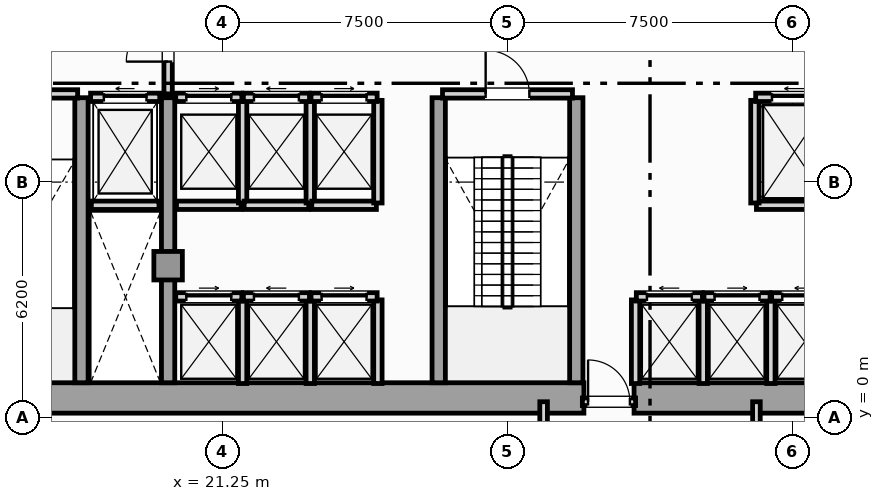
"""IFC4 building model, lengths in metres.
Left out: names, types, materials, properties, quantities, classifications, styles, units other than length and angle.
Written with IfcOpenShell. Run it as: python <this file> out.ifc"""

import sys

from ifc_helpers import new_model, si_unit, direction, frame, frame_2d, origin, origin_2d, place, context, subcontext, project, spatial, rectangle, extrude, element, fill, save


model = new_model("IFC4")
c1 = context("Model", 3, precision=1e-05, world=origin(), true_north=direction((0.0, 1.0)))
c2 = subcontext(c1, "Body", "Model", "MODEL_VIEW")
j1 = project(units=[si_unit("LENGTHUNIT", "METRE"), si_unit("PLANEANGLEUNIT", "RADIAN")], contexts=[c1])
p1 = place(None, origin())
s1 = spatial("IfcSite", under=j1, at=p1, CompositionType="ELEMENT")
p2 = place(p1, origin())
s2 = spatial("IfcBuilding", under=s1, at=p2, CompositionType="ELEMENT")
p3 = place(p2, origin())
s3 = spatial("IfcBuildingStorey", under=s2, at=p3, CompositionType="ELEMENT", Elevation=0.0)
p4 = place(p3, frame((13.25, 0.52, 0.0), z_axis=(0.0, 0.0, 1.0), x_axis=(1.0, 0.0, 0.0)))
e1 = element("IfcWall", 1, at=p4, inside=s3, PredefinedType="SHEAR", context=c2, shape_type="SweptSolid", body=[
    extrude(rectangle(XDim=17.51, YDim=0.8, at=frame_2d((8.755, 0.0))), origin(), (0.0, 0.0, 1.0), 5.1),
])
p5 = place(p3, frame((32.08, 0.52, 0.0), z_axis=(0.0, 0.0, 1.0), x_axis=(1.0, 0.0, 0.0)))
e2 = element("IfcWall", 2, at=p5, inside=s3, PredefinedType="SHEAR", context=c2, shape_type="SweptSolid", body=[
    extrude(rectangle(XDim=12.17, YDim=0.8, at=frame_2d((6.085, 0.0))), origin(), (0.0, 0.0, 1.0), 5.1),
])
for number, where, z_axis, x_axis in (
    (3, (17.54, 0.92, 0.0), (0.0, 0.0, 1.0), (0.0, 1.0, 0.0)),
    (4, (19.82, 0.92, 0.0), (0.0, 0.0, 1.0), (0.0, 1.0, 0.0)),
    (5, (26.94, 0.92, 0.0), (0.0, 0.0, 1.0), (0.0, 1.0, 0.0)),
    (6, (30.56, 0.92, 0.0), (0.0, 0.0, 1.0), (0.0, 1.0, 0.0)),
):
    element("IfcWall", number, at=place(p3, frame(where, z_axis=z_axis, x_axis=x_axis)), inside=s3, PredefinedType="SHEAR", context=c2, shape_type="SweptSolid", body=[
        extrude(rectangle(XDim=7.5, YDim=0.35, at=frame_2d((3.75, 0.0))), origin(), (0.0, 0.0, 1.0), 5.1),
    ])
p6 = place(p3, frame((19.82, 4.0, 0.0), z_axis=(0.0, 0.0, 1.0), x_axis=(1.0, 0.0, 0.0)))
e7 = element("IfcColumn", 7, at=p6, inside=s3, PredefinedType="COLUMN", context=c2, shape_type="SweptSolid", body=[
    extrude(rectangle(XDim=0.75, YDim=0.75, at=origin_2d()), origin(), (0.0, 0.0, 1.0), 5.4),
])
p7 = place(p3, frame((17.8, 5.59, 0.0), z_axis=(0.0, 0.0, 1.0), x_axis=(1.0, 0.0, 0.0)))
e8 = element("IfcWall", 8, at=p7, inside=s3, PredefinedType="SOLIDWALL", context=c2, shape_type="SweptSolid", body=[
    extrude(rectangle(XDim=1.78, YDim=0.22, at=frame_2d((0.89, 0.0))), origin(), (0.0, 0.0, 1.0), 5.1),
])
p8 = place(p3, frame((17.78, 8.43, 0.0), z_axis=(0.0, 0.0, 1.0), x_axis=(1.0, 0.0, 0.0)))
e9 = element("IfcWall", 9, at=p8, inside=s3, PredefinedType="SOLIDWALL", context=c2, shape_type="SweptSolid", body=[
    extrude(rectangle(XDim=1.82, YDim=0.22, at=frame_2d((0.91, 0.0))), origin(), (0.0, 0.0, 1.0), 5.1),
])
p9 = place(p8, frame((0.35, 0.0, 0.0)))
e10 = element("IfcOpeningElement", 10, at=p9, cuts=e9, PredefinedType="OPENING", context=c2, shape_type="SweptSolid", body=[
    extrude(rectangle(XDim=1.12, YDim=2.25, at=frame_2d((0.56, 1.125))), frame((0.0, 0.12, 0.0), z_axis=(0.0, -1.0, 0.0), x_axis=(1.0, 0.0, 0.0)), (0.0, 0.0, 1.0), 0.24),
])
p10 = place(p3, frame((35.3, 5.59, 0.0), z_axis=(0.0, 0.0, 1.0), x_axis=(1.0, 0.0, 0.0)))
e11 = element("IfcWall", 11, at=p10, inside=s3, PredefinedType="SOLIDWALL", context=c2, shape_type="SweptSolid", body=[
    extrude(rectangle(XDim=2.0, YDim=0.22, at=frame_2d((1.0, 0.0))), origin(), (0.0, 0.0, 1.0), 5.1),
])
p11 = place(p3, frame((35.26, 5.65, 0.0), z_axis=(0.0, 0.0, 1.0), x_axis=(0.0, 1.0, 0.0)))
e12 = element("IfcWall", 12, at=p11, inside=s3, PredefinedType="SOLIDWALL", context=c2, shape_type="SweptSolid", body=[
    extrude(rectangle(XDim=2.7, YDim=0.22, at=frame_2d((1.35, 0.0))), origin(), (0.0, 0.0, 1.0), 5.1),
])
p12 = place(p3, frame((35.28, 8.43, 0.0), z_axis=(0.0, 0.0, 1.0), x_axis=(1.0, 0.0, 0.0)))
e13 = element("IfcWall", 13, at=p12, inside=s3, PredefinedType="SOLIDWALL", context=c2, shape_type="SweptSolid", body=[
    extrude(rectangle(XDim=2.04, YDim=0.22, at=frame_2d((1.02, 0.0))), origin(), (0.0, 0.0, 1.0), 5.1),
])
p13 = place(p12, frame((0.43, 0.0, 0.0)))
e14 = element("IfcOpeningElement", 14, at=p13, cuts=e13, PredefinedType="OPENING", context=c2, shape_type="SweptSolid", body=[
    extrude(rectangle(XDim=1.18, YDim=2.2, at=frame_2d((0.59, 1.1))), frame((0.0, 0.12, 0.0), z_axis=(0.0, -1.0, 0.0), x_axis=(1.0, 0.0, 0.0)), (0.0, 0.0, 1.0), 0.24),
])
p14 = place(p3, frame((21.78, 0.9, 0.0), z_axis=(0.0, 0.0, 1.0), x_axis=(0.0, 1.0, 0.0)))
e15 = element("IfcWall", 15, at=p14, inside=s3, PredefinedType="SOLIDWALL", context=c2, shape_type="SweptSolid", body=[
    extrude(rectangle(XDim=2.2, YDim=0.22, at=frame_2d((1.1, 0.0))), origin(), (0.0, 0.0, 1.0), 5.1),
])
p15 = place(p3, frame((20.02, 3.18, 0.0), z_axis=(0.0, 0.0, 1.0), x_axis=(1.0, 0.0, 0.0)))
e16 = element("IfcWall", 16, at=p15, inside=s3, PredefinedType="SOLIDWALL", context=c2, shape_type="SweptSolid", body=[
    extrude(rectangle(XDim=1.74, YDim=0.22, at=frame_2d((0.87, 0.0))), origin(), (0.0, 0.0, 1.0), 5.1),
])
p16 = place(p15, frame((0.28, 0.0, 0.0)))
e17 = element("IfcOpeningElement", 17, at=p16, cuts=e16, PredefinedType="OPENING", context=c2, shape_type="SweptSolid", body=[
    extrude(rectangle(XDim=1.18, YDim=2.2, at=frame_2d((0.59, 1.1))), frame((0.0, 0.12, 0.0), z_axis=(0.0, -1.0, 0.0), x_axis=(1.0, 0.0, 0.0)), (0.0, 0.0, 1.0), 0.24),
])
p17 = place(p3, frame((23.56, 0.9, 0.0), z_axis=(0.0, 0.0, 1.0), x_axis=(0.0, 1.0, 0.0)))
e18 = element("IfcWall", 18, at=p17, inside=s3, PredefinedType="SOLIDWALL", context=c2, shape_type="SweptSolid", body=[
    extrude(rectangle(XDim=2.2, YDim=0.22, at=frame_2d((1.1, 0.0))), origin(), (0.0, 0.0, 1.0), 5.1),
])
p18 = place(p3, frame((21.8, 3.18, 0.0), z_axis=(0.0, 0.0, 1.0), x_axis=(1.0, 0.0, 0.0)))
e19 = element("IfcWall", 19, at=p18, inside=s3, PredefinedType="SOLIDWALL", context=c2, shape_type="SweptSolid", body=[
    extrude(rectangle(XDim=1.74, YDim=0.22, at=frame_2d((0.87, 0.0))), origin(), (0.0, 0.0, 1.0), 5.1),
])
p19 = place(p18, frame((0.28, 0.0, 0.0)))
e20 = element("IfcOpeningElement", 20, at=p19, cuts=e19, PredefinedType="OPENING", context=c2, shape_type="SweptSolid", body=[
    extrude(rectangle(XDim=1.18, YDim=2.2, at=frame_2d((0.59, 1.1))), frame((0.0, 0.12, 0.0), z_axis=(0.0, -1.0, 0.0), x_axis=(1.0, 0.0, 0.0)), (0.0, 0.0, 1.0), 0.24),
])
p20 = place(p3, frame((25.34, 0.9, 0.0), z_axis=(0.0, 0.0, 1.0), x_axis=(0.0, 1.0, 0.0)))
e21 = element("IfcWall", 21, at=p20, inside=s3, PredefinedType="SOLIDWALL", context=c2, shape_type="SweptSolid", body=[
    extrude(rectangle(XDim=2.2, YDim=0.22, at=frame_2d((1.1, 0.0))), origin(), (0.0, 0.0, 1.0), 5.1),
])
p21 = place(p3, frame((23.58, 3.18, 0.0), z_axis=(0.0, 0.0, 1.0), x_axis=(1.0, 0.0, 0.0)))
e22 = element("IfcWall", 22, at=p21, inside=s3, PredefinedType="SOLIDWALL", context=c2, shape_type="SweptSolid", body=[
    extrude(rectangle(XDim=1.74, YDim=0.22, at=frame_2d((0.87, 0.0))), origin(), (0.0, 0.0, 1.0), 5.1),
])
p22 = place(p21, frame((0.28, 0.0, 0.0)))
e23 = element("IfcOpeningElement", 23, at=p22, cuts=e22, PredefinedType="OPENING", context=c2, shape_type="SweptSolid", body=[
    extrude(rectangle(XDim=1.18, YDim=2.2, at=frame_2d((0.59, 1.1))), frame((0.0, 0.12, 0.0), z_axis=(0.0, -1.0, 0.0), x_axis=(1.0, 0.0, 0.0)), (0.0, 0.0, 1.0), 0.24),
])
for number, where, z_axis, x_axis in (
    (24, (32.12, 0.9, 0.0), (0.0, 0.0, 1.0), (0.0, 1.0, 0.0)),
    (25, (33.9, 0.9, 0.0), (0.0, 0.0, 1.0), (0.0, 1.0, 0.0)),
):
    element("IfcWall", number, at=place(p3, frame(where, z_axis=z_axis, x_axis=x_axis)), inside=s3, PredefinedType="SOLIDWALL", context=c2, shape_type="SweptSolid", body=[
        extrude(rectangle(XDim=2.2, YDim=0.22, at=frame_2d((1.1, 0.0))), origin(), (0.0, 0.0, 1.0), 5.1),
    ])
p23 = place(p3, frame((32.14, 3.18, 0.0), z_axis=(0.0, 0.0, 1.0), x_axis=(1.0, 0.0, 0.0)))
e26 = element("IfcWall", 26, at=p23, inside=s3, PredefinedType="SOLIDWALL", context=c2, shape_type="SweptSolid", body=[
    extrude(rectangle(XDim=1.74, YDim=0.22, at=frame_2d((0.87, 0.0))), origin(), (0.0, 0.0, 1.0), 5.1),
])
p24 = place(p23, frame((0.28, 0.0, 0.0)))
e27 = element("IfcOpeningElement", 27, at=p24, cuts=e26, PredefinedType="OPENING", context=c2, shape_type="SweptSolid", body=[
    extrude(rectangle(XDim=1.18, YDim=2.2, at=frame_2d((0.59, 1.1))), frame((0.0, 0.12, 0.0), z_axis=(0.0, -1.0, 0.0), x_axis=(1.0, 0.0, 0.0)), (0.0, 0.0, 1.0), 0.24),
])
p25 = place(p3, frame((35.68, 0.9, 0.0), z_axis=(0.0, 0.0, 1.0), x_axis=(0.0, 1.0, 0.0)))
e28 = element("IfcWall", 28, at=p25, inside=s3, PredefinedType="SOLIDWALL", context=c2, shape_type="SweptSolid", body=[
    extrude(rectangle(XDim=2.2, YDim=0.22, at=frame_2d((1.1, 0.0))), origin(), (0.0, 0.0, 1.0), 5.1),
])
p26 = place(p3, frame((33.92, 3.18, 0.0), z_axis=(0.0, 0.0, 1.0), x_axis=(1.0, 0.0, 0.0)))
e29 = element("IfcWall", 29, at=p26, inside=s3, PredefinedType="SOLIDWALL", context=c2, shape_type="SweptSolid", body=[
    extrude(rectangle(XDim=1.74, YDim=0.22, at=frame_2d((0.87, 0.0))), origin(), (0.0, 0.0, 1.0), 5.1),
])
p27 = place(p26, frame((0.28, 0.0, 0.0)))
e30 = element("IfcOpeningElement", 30, at=p27, cuts=e29, PredefinedType="OPENING", context=c2, shape_type="SweptSolid", body=[
    extrude(rectangle(XDim=1.18, YDim=2.2, at=frame_2d((0.59, 1.1))), frame((0.0, 0.12, 0.0), z_axis=(0.0, -1.0, 0.0), x_axis=(1.0, 0.0, 0.0)), (0.0, 0.0, 1.0), 0.24),
])
p28 = place(p3, frame((35.7, 3.18, 0.0), z_axis=(0.0, 0.0, 1.0), x_axis=(1.0, 0.0, 0.0)))
e31 = element("IfcWall", 31, at=p28, inside=s3, PredefinedType="SOLIDWALL", context=c2, shape_type="SweptSolid", body=[
    extrude(rectangle(XDim=1.74, YDim=0.22, at=frame_2d((0.87, 0.0))), origin(), (0.0, 0.0, 1.0), 5.1),
])
p29 = place(p28, frame((0.28, 0.0, 0.0)))
e32 = element("IfcOpeningElement", 32, at=p29, cuts=e31, PredefinedType="OPENING", context=c2, shape_type="SweptSolid", body=[
    extrude(rectangle(XDim=1.18, YDim=2.2, at=frame_2d((0.59, 1.1))), frame((0.0, 0.12, 0.0), z_axis=(0.0, -1.0, 0.0), x_axis=(1.0, 0.0, 0.0)), (0.0, 0.0, 1.0), 0.24),
])
p30 = place(p3, frame((20.04, 5.59, 0.0), z_axis=(0.0, 0.0, 1.0), x_axis=(1.0, 0.0, 0.0)))
e33 = element("IfcWall", 33, at=p30, inside=s3, PredefinedType="SOLIDWALL", context=c2, shape_type="SweptSolid", body=[
    extrude(rectangle(XDim=1.7, YDim=0.22, at=frame_2d((0.85, 0.0))), origin(), (0.0, 0.0, 1.0), 5.1),
])
p31 = place(p3, frame((21.78, 5.65, 0.0), z_axis=(0.0, 0.0, 1.0), x_axis=(0.0, 1.0, 0.0)))
e34 = element("IfcWall", 34, at=p31, inside=s3, PredefinedType="SOLIDWALL", context=c2, shape_type="SweptSolid", body=[
    extrude(rectangle(XDim=2.7, YDim=0.22, at=frame_2d((1.35, 0.0))), origin(), (0.0, 0.0, 1.0), 5.1),
])
p32 = place(p3, frame((20.02, 8.43, 0.0), z_axis=(0.0, 0.0, 1.0), x_axis=(1.0, 0.0, 0.0)))
e35 = element("IfcWall", 35, at=p32, inside=s3, PredefinedType="SOLIDWALL", context=c2, shape_type="SweptSolid", body=[
    extrude(rectangle(XDim=1.74, YDim=0.22, at=frame_2d((0.87, 0.0))), origin(), (0.0, 0.0, 1.0), 5.1),
])
p33 = place(p32, frame((0.28, 0.0, 0.0)))
e36 = element("IfcOpeningElement", 36, at=p33, cuts=e35, PredefinedType="OPENING", context=c2, shape_type="SweptSolid", body=[
    extrude(rectangle(XDim=1.18, YDim=2.2, at=frame_2d((0.59, 1.1))), frame((0.0, 0.12, 0.0), z_axis=(0.0, -1.0, 0.0), x_axis=(1.0, 0.0, 0.0)), (0.0, 0.0, 1.0), 0.24),
])
p34 = place(p3, frame((21.82, 5.59, 0.0), z_axis=(0.0, 0.0, 1.0), x_axis=(1.0, 0.0, 0.0)))
e37 = element("IfcWall", 37, at=p34, inside=s3, PredefinedType="SOLIDWALL", context=c2, shape_type="SweptSolid", body=[
    extrude(rectangle(XDim=1.7, YDim=0.22, at=frame_2d((0.85, 0.0))), origin(), (0.0, 0.0, 1.0), 5.1),
])
p35 = place(p3, frame((23.56, 5.65, 0.0), z_axis=(0.0, 0.0, 1.0), x_axis=(0.0, 1.0, 0.0)))
e38 = element("IfcWall", 38, at=p35, inside=s3, PredefinedType="SOLIDWALL", context=c2, shape_type="SweptSolid", body=[
    extrude(rectangle(XDim=2.7, YDim=0.22, at=frame_2d((1.35, 0.0))), origin(), (0.0, 0.0, 1.0), 5.1),
])
p36 = place(p3, frame((21.8, 8.43, 0.0), z_axis=(0.0, 0.0, 1.0), x_axis=(1.0, 0.0, 0.0)))
e39 = element("IfcWall", 39, at=p36, inside=s3, PredefinedType="SOLIDWALL", context=c2, shape_type="SweptSolid", body=[
    extrude(rectangle(XDim=1.74, YDim=0.22, at=frame_2d((0.87, 0.0))), origin(), (0.0, 0.0, 1.0), 5.1),
])
p37 = place(p36, frame((0.28, 0.0, 0.0)))
e40 = element("IfcOpeningElement", 40, at=p37, cuts=e39, PredefinedType="OPENING", context=c2, shape_type="SweptSolid", body=[
    extrude(rectangle(XDim=1.18, YDim=2.2, at=frame_2d((0.59, 1.1))), frame((0.0, 0.12, 0.0), z_axis=(0.0, -1.0, 0.0), x_axis=(1.0, 0.0, 0.0)), (0.0, 0.0, 1.0), 0.24),
])
p38 = place(p3, frame((23.6, 5.59, 0.0), z_axis=(0.0, 0.0, 1.0), x_axis=(1.0, 0.0, 0.0)))
e41 = element("IfcWall", 41, at=p38, inside=s3, PredefinedType="SOLIDWALL", context=c2, shape_type="SweptSolid", body=[
    extrude(rectangle(XDim=1.7, YDim=0.22, at=frame_2d((0.85, 0.0))), origin(), (0.0, 0.0, 1.0), 5.1),
])
p39 = place(p3, frame((25.34, 5.65, 0.0), z_axis=(0.0, 0.0, 1.0), x_axis=(0.0, 1.0, 0.0)))
e42 = element("IfcWall", 42, at=p39, inside=s3, PredefinedType="SOLIDWALL", context=c2, shape_type="SweptSolid", body=[
    extrude(rectangle(XDim=2.7, YDim=0.22, at=frame_2d((1.35, 0.0))), origin(), (0.0, 0.0, 1.0), 5.1),
])
p40 = place(p3, frame((23.58, 8.43, 0.0), z_axis=(0.0, 0.0, 1.0), x_axis=(1.0, 0.0, 0.0)))
e43 = element("IfcWall", 43, at=p40, inside=s3, PredefinedType="SOLIDWALL", context=c2, shape_type="SweptSolid", body=[
    extrude(rectangle(XDim=1.74, YDim=0.22, at=frame_2d((0.87, 0.0))), origin(), (0.0, 0.0, 1.0), 5.1),
])
p41 = place(p40, frame((0.28, 0.0, 0.0)))
e44 = element("IfcOpeningElement", 44, at=p41, cuts=e43, PredefinedType="OPENING", context=c2, shape_type="SweptSolid", body=[
    extrude(rectangle(XDim=1.18, YDim=2.2, at=frame_2d((0.59, 1.1))), frame((0.0, 0.12, 0.0), z_axis=(0.0, -1.0, 0.0), x_axis=(1.0, 0.0, 0.0)), (0.0, 0.0, 1.0), 0.24),
])
p42 = place(p3, frame((30.72, 0.42, 0.0), z_axis=(0.0, 0.0, 1.0), x_axis=(1.0, 0.0, 0.0)))
e45 = element("IfcWall", 45, at=p42, inside=s3, PredefinedType="PARTITIONING", context=c2, shape_type="SweptSolid", body=[
    extrude(rectangle(XDim=1.4, YDim=0.2, at=frame_2d((0.7, 0.0))), origin(), (0.0, 0.0, 1.0), 4.555),
])
p43 = place(p42, frame((0.15, 0.0, 0.0)))
e46 = element("IfcOpeningElement", 46, at=p43, cuts=e45, PredefinedType="OPENING", context=c2, shape_type="SweptSolid", body=[
    extrude(rectangle(XDim=1.1, YDim=2.2, at=frame_2d((0.55, 1.1))), frame((0.0, 0.11, 0.0), z_axis=(0.0, -1.0, 0.0), x_axis=(1.0, 0.0, 0.0)), (0.0, 0.0, 1.0), 0.22),
])
for number, where, z_axis, x_axis in (
    (47, (29.7, -2.75, 0.0), (0.0, 0.0, 1.0), (0.0, 1.0, 0.0)),
    (48, (35.3, -2.75, 0.0), (0.0, 0.0, 1.0), (0.0, 1.0, 0.0)),
):
    element("IfcWall", number, at=place(p3, frame(where, z_axis=z_axis, x_axis=x_axis)), inside=s3, PredefinedType="PARTITIONING", context=c2, shape_type="SweptSolid", body=[
        extrude(rectangle(XDim=3.17, YDim=0.2, at=frame_2d((1.585, 0.0))), origin(), (0.0, 0.0, 1.0), 5.1),
    ])
p44 = place(p3, frame((14.04, 8.52, 0.0), z_axis=(0.0, 0.0, 1.0), x_axis=(1.0, 0.0, 0.0)))
e49 = element("IfcWall", 49, at=p44, inside=s3, PredefinedType="SOLIDWALL", context=c2, shape_type="SweptSolid", body=[
    extrude(rectangle(XDim=3.4, YDim=0.22, at=frame_2d((1.7, 0.0))), origin(), (0.0, 0.0, 1.0), 5.1),
])
p45 = place(p44, frame((1.125, 0.0, 0.0)))
e50 = element("IfcOpeningElement", 50, at=p45, cuts=e49, PredefinedType="OPENING", context=c2, shape_type="SweptSolid", body=[
    extrude(rectangle(XDim=1.15, YDim=2.2, at=frame_2d((0.575, 1.1))), frame((0.0, 0.12, 0.0), z_axis=(0.0, -1.0, 0.0), x_axis=(1.0, 0.0, 0.0)), (0.0, 0.0, 1.0), 0.24),
])
p46 = place(p3, frame((27.04, 8.52, 0.0), z_axis=(0.0, 0.0, 1.0), x_axis=(1.0, 0.0, 0.0)))
e51 = element("IfcWall", 51, at=p46, inside=s3, PredefinedType="SOLIDWALL", context=c2, shape_type="SweptSolid", body=[
    extrude(rectangle(XDim=3.42, YDim=0.22, at=frame_2d((1.71, 0.0))), origin(), (0.0, 0.0, 1.0), 5.1),
])
p47 = place(p46, frame((1.135, 0.0, 0.0)))
e52 = element("IfcOpeningElement", 52, at=p47, cuts=e51, PredefinedType="OPENING", context=c2, shape_type="SweptSolid", body=[
    extrude(rectangle(XDim=1.15, YDim=2.2, at=frame_2d((0.575, 1.1))), frame((0.0, 0.12, 0.0), z_axis=(0.0, -1.0, 0.0), x_axis=(1.0, 0.0, 0.0)), (0.0, 0.0, 1.0), 0.24),
])
p48 = place(p3, frame((19.82, 8.52, 0.0), z_axis=(0.0, 0.0, 1.0), x_axis=(0.0, 1.0, 0.0)))
e53 = element("IfcWall", 53, at=p48, inside=s3, PredefinedType="SOLIDWALL", context=c2, shape_type="SweptSolid", body=[
    extrude(rectangle(XDim=2.8, YDim=0.22, at=frame_2d((1.4, 0.0))), origin(), (0.0, 0.0, 1.0), 4.555),
])
p49 = place(p48, frame((0.85, 0.0, 0.0)))
e54 = element("IfcOpeningElement", 54, at=p49, cuts=e53, PredefinedType="OPENING", context=c2, shape_type="SweptSolid", body=[
    extrude(rectangle(XDim=1.1, YDim=2.2, at=frame_2d((0.55, 1.1))), frame((0.0, 0.12, 0.0), z_axis=(0.0, -1.0, 0.0), x_axis=(1.0, 0.0, 0.0)), (0.0, 0.0, 1.0), 0.24),
])
p50 = place(p9, origin())
e55 = element("IfcDoor", 55, at=p50, inside=s3, OperationType="SLIDING_TO_LEFT", PredefinedType="DOOR", context=c2, shape_type="SweptSolid", body=[
    extrude(rectangle(XDim=1.12, YDim=2.25, at=frame_2d((0.56, 1.125))), frame((0.0, 0.025, 0.0), z_axis=(0.0, -1.0, 0.0), x_axis=(1.0, 0.0, 0.0)), (0.0, 0.0, 1.0), 0.05),
])
fill(e10, e55)
p51 = place(p13, origin())
e56 = element("IfcDoor", 56, at=p51, inside=s3, OperationType="SLIDING_TO_LEFT", PredefinedType="DOOR", context=c2, shape_type="SweptSolid", body=[
    extrude(rectangle(XDim=1.18, YDim=2.2, at=frame_2d((0.59, 1.1))), frame((0.0, 0.025, 0.0), z_axis=(0.0, -1.0, 0.0), x_axis=(1.0, 0.0, 0.0)), (0.0, 0.0, 1.0), 0.05),
])
fill(e14, e56)
p52 = place(p16, origin())
e57 = element("IfcDoor", 57, at=p52, inside=s3, OperationType="SLIDING_TO_RIGHT", PredefinedType="DOOR", context=c2, shape_type="SweptSolid", body=[
    extrude(rectangle(XDim=1.18, YDim=2.2, at=frame_2d((0.59, 1.1))), frame((0.0, 0.025, 0.0), z_axis=(0.0, -1.0, 0.0), x_axis=(1.0, 0.0, 0.0)), (0.0, 0.0, 1.0), 0.05),
])
fill(e17, e57)
p53 = place(p19, origin())
e58 = element("IfcDoor", 58, at=p53, inside=s3, OperationType="SLIDING_TO_LEFT", PredefinedType="DOOR", context=c2, shape_type="SweptSolid", body=[
    extrude(rectangle(XDim=1.18, YDim=2.2, at=frame_2d((0.59, 1.1))), frame((0.0, 0.025, 0.0), z_axis=(0.0, -1.0, 0.0), x_axis=(1.0, 0.0, 0.0)), (0.0, 0.0, 1.0), 0.05),
])
fill(e20, e58)
p54 = place(p22, origin())
e59 = element("IfcDoor", 59, at=p54, inside=s3, OperationType="SLIDING_TO_RIGHT", PredefinedType="DOOR", context=c2, shape_type="SweptSolid", body=[
    extrude(rectangle(XDim=1.18, YDim=2.2, at=frame_2d((0.59, 1.1))), frame((0.0, 0.025, 0.0), z_axis=(0.0, -1.0, 0.0), x_axis=(1.0, 0.0, 0.0)), (0.0, 0.0, 1.0), 0.05),
])
fill(e23, e59)
p55 = place(p24, origin())
e60 = element("IfcDoor", 60, at=p55, inside=s3, OperationType="SLIDING_TO_LEFT", PredefinedType="DOOR", context=c2, shape_type="SweptSolid", body=[
    extrude(rectangle(XDim=1.18, YDim=2.2, at=frame_2d((0.59, 1.1))), frame((0.0, 0.025, 0.0), z_axis=(0.0, -1.0, 0.0), x_axis=(1.0, 0.0, 0.0)), (0.0, 0.0, 1.0), 0.05),
])
fill(e27, e60)
p56 = place(p27, origin())
e61 = element("IfcDoor", 61, at=p56, inside=s3, OperationType="SLIDING_TO_RIGHT", PredefinedType="DOOR", context=c2, shape_type="SweptSolid", body=[
    extrude(rectangle(XDim=1.18, YDim=2.2, at=frame_2d((0.59, 1.1))), frame((0.0, 0.025, 0.0), z_axis=(0.0, -1.0, 0.0), x_axis=(1.0, 0.0, 0.0)), (0.0, 0.0, 1.0), 0.05),
])
fill(e30, e61)
p57 = place(p29, origin())
e62 = element("IfcDoor", 62, at=p57, inside=s3, OperationType="SLIDING_TO_LEFT", PredefinedType="DOOR", context=c2, shape_type="SweptSolid", body=[
    extrude(rectangle(XDim=1.18, YDim=2.2, at=frame_2d((0.59, 1.1))), frame((0.0, 0.025, 0.0), z_axis=(0.0, -1.0, 0.0), x_axis=(1.0, 0.0, 0.0)), (0.0, 0.0, 1.0), 0.05),
])
fill(e32, e62)
p58 = place(p33, origin())
e63 = element("IfcDoor", 63, at=p58, inside=s3, OperationType="SLIDING_TO_RIGHT", PredefinedType="DOOR", context=c2, shape_type="SweptSolid", body=[
    extrude(rectangle(XDim=1.18, YDim=2.2, at=frame_2d((0.59, 1.1))), frame((0.0, 0.025, 0.0), z_axis=(0.0, -1.0, 0.0), x_axis=(1.0, 0.0, 0.0)), (0.0, 0.0, 1.0), 0.05),
])
fill(e36, e63)
p59 = place(p37, origin())
e64 = element("IfcDoor", 64, at=p59, inside=s3, OperationType="SLIDING_TO_LEFT", PredefinedType="DOOR", context=c2, shape_type="SweptSolid", body=[
    extrude(rectangle(XDim=1.18, YDim=2.2, at=frame_2d((0.59, 1.1))), frame((0.0, 0.025, 0.0), z_axis=(0.0, -1.0, 0.0), x_axis=(1.0, 0.0, 0.0)), (0.0, 0.0, 1.0), 0.05),
])
fill(e40, e64)
p60 = place(p41, origin())
e65 = element("IfcDoor", 65, at=p60, inside=s3, OperationType="SLIDING_TO_RIGHT", PredefinedType="DOOR", context=c2, shape_type="SweptSolid", body=[
    extrude(rectangle(XDim=1.18, YDim=2.2, at=frame_2d((0.59, 1.1))), frame((0.0, 0.025, 0.0), z_axis=(0.0, -1.0, 0.0), x_axis=(1.0, 0.0, 0.0)), (0.0, 0.0, 1.0), 0.05),
])
fill(e44, e65)
p61 = place(p43, origin())
e66 = element("IfcDoor", 66, at=p61, inside=s3, OperationType="SINGLE_SWING_LEFT", PredefinedType="DOOR", context=c2, shape_type="SweptSolid", body=[
    extrude(rectangle(XDim=1.1, YDim=2.2, at=frame_2d((0.55, 1.1))), frame((0.0, 0.025, 0.0), z_axis=(0.0, -1.0, 0.0), x_axis=(1.0, 0.0, 0.0)), (0.0, 0.0, 1.0), 0.05),
])
fill(e46, e66)
p62 = place(p47, origin())
e67 = element("IfcDoor", 67, at=p62, inside=s3, OperationType="SINGLE_SWING_LEFT", PredefinedType="DOOR", context=c2, shape_type="SweptSolid", body=[
    extrude(rectangle(XDim=1.15, YDim=2.2, at=frame_2d((0.575, 1.1))), frame((0.0, 0.025, 0.0), z_axis=(0.0, -1.0, 0.0), x_axis=(1.0, 0.0, 0.0)), (0.0, 0.0, 1.0), 0.05),
])
fill(e52, e67)
p63 = place(p49, origin())
e68 = element("IfcDoor", 68, at=p63, inside=s3, OperationType="SINGLE_SWING_LEFT", PredefinedType="DOOR", context=c2, shape_type="SweptSolid", body=[
    extrude(rectangle(XDim=1.1, YDim=2.2, at=frame_2d((0.55, 1.1))), frame((0.0, 0.025, 0.0), z_axis=(0.0, -1.0, 0.0), x_axis=(1.0, 0.0, 0.0)), (0.0, 0.0, 1.0), 0.05),
])
fill(e54, e68)
save(model, sys.argv[1])
